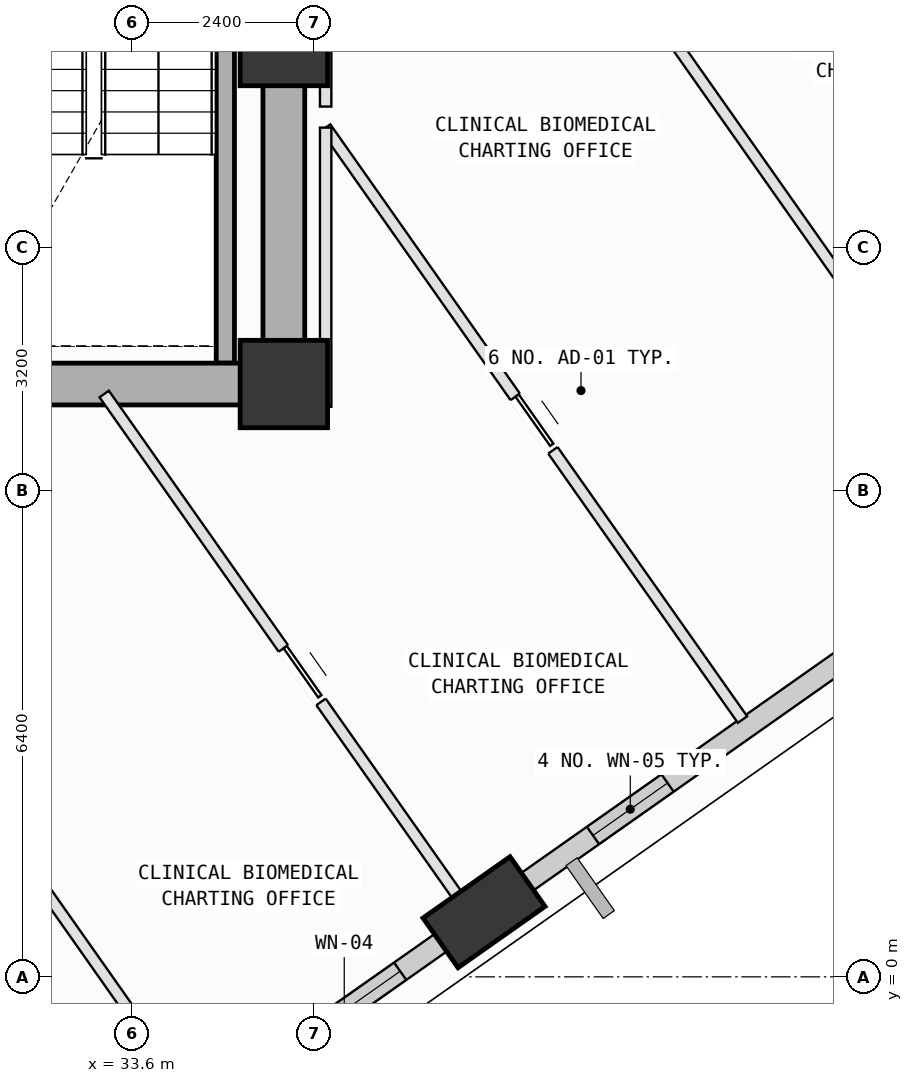
"""IFC4 building model, lengths in metres.
Left out: names, types, materials, properties, quantities, classifications, styles, units other than length and angle.
Written with IfcOpenShell. Run it as: python <this file> out.ifc"""

import sys

from ifc_helpers import new_model, si_unit, direction, frame, frame_2d, origin, origin_2d, place, context, subcontext, project, spatial, rectangle, extrude, element, fill, save


model = new_model("IFC4")
c1 = context("Model", 3, precision=1e-05, world=origin(), true_north=direction((0.0, 1.0)))
c2 = subcontext(c1, "Body", "Model", "MODEL_VIEW")
j1 = project(units=[si_unit("LENGTHUNIT", "METRE"), si_unit("PLANEANGLEUNIT", "RADIAN")], contexts=[c1])
p1 = place(None, origin())
s1 = spatial("IfcSite", under=j1, at=p1, CompositionType="ELEMENT")
p2 = place(p1, origin())
s2 = spatial("IfcBuilding", under=s1, at=p2, CompositionType="ELEMENT")
p3 = place(p2, frame((0.0, 0.0, 173.8)))
s3 = spatial("IfcBuildingStorey", under=s2, at=p3, CompositionType="ELEMENT", Elevation=173.8)
for number, where, z_axis, x_axis in (
    (1, (35.6, 7.8, 0.0), (0.0, 0.0, 1.0), (1.0, 0.0, 0.0)),
    (2, (35.6, 12.3, 0.0), (0.0, 0.0, 1.0), (1.0, 0.0, 0.0)),
):
    element("IfcColumn", number, at=place(p3, frame(where, z_axis=z_axis, x_axis=x_axis)), inside=s3, PredefinedType="COLUMN", context=c2, shape_type="SweptSolid", body=[
        extrude(rectangle(XDim=1.15, YDim=1.15, at=origin_2d()), origin(), (0.0, 0.0, 1.0), 4.0),
    ])
p4 = place(p3, frame((38.233, 0.85, 0.002), z_axis=(0.098647418268, 0.01993613875, 0.994922729281), x_axis=(-0.723413215701, 0.687979735835, 0.057941370623)))
e3 = element("IfcColumn", 3, at=p4, inside=s3, PredefinedType="COLUMN", context=c2, shape_type="SweptSolid", body=[
    extrude(rectangle(XDim=1.4, YDim=0.8, at=origin_2d()), origin(), (0.0, 0.0, 1.0), 4.017),
])
p5 = place(p3, frame((37.984, 0.675, 0.0), z_axis=(0.0, 0.0, 1.0), x_axis=(-0.817652115321, -0.575712617814, 0.0)))
e4 = element("IfcWall", 4, at=p5, inside=s3, PredefinedType="SOLIDWALL", context=c2, shape_type="SweptSolid", body=[
    extrude(rectangle(XDim=6.234, YDim=0.28, at=frame_2d((3.117, 0.0))), origin(), (0.0, 0.0, 1.0), 3.265),
])
p6 = place(p5, frame((1.044, 0.0, 0.75)))
e5 = element("IfcOpeningElement", 5, at=p6, cuts=e4, PredefinedType="OPENING", context=c2, shape_type="SweptSolid", body=[
    extrude(rectangle(XDim=1.8, YDim=2.05, at=frame_2d((0.9, 1.025))), frame((0.0, 0.15, 0.0), z_axis=(0.0, -1.0, 0.0), x_axis=(1.0, 0.0, 0.0)), (0.0, 0.0, 1.0), 0.3),
])
p7 = place(p3, frame((43.866, 4.816, 0.0), z_axis=(0.0, 0.0, 1.0), x_axis=(-0.81764887873, -0.575717214535, 0.0)))
e6 = element("IfcWall", 6, at=p7, inside=s3, PredefinedType="SOLIDWALL", context=c2, shape_type="SweptSolid", body=[
    extrude(rectangle(XDim=6.214, YDim=0.28, at=frame_2d((3.107, 0.0))), origin(), (0.0, 0.0, 1.0), 3.265),
])
p8 = place(p7, frame((3.935, 0.0, 0.75)))
e7 = element("IfcOpeningElement", 7, at=p8, cuts=e6, PredefinedType="OPENING", context=c2, shape_type="SweptSolid", body=[
    extrude(rectangle(XDim=1.2, YDim=1.75, at=frame_2d((0.6, 0.875))), frame((0.0, 0.15, 0.0), z_axis=(0.0, -1.0, 0.0), x_axis=(1.0, 0.0, 0.0)), (0.0, 0.0, 1.0), 0.3),
])
p9 = place(p3, frame((34.83, 15.12, 0.0), z_axis=(0.0, 0.0, 1.0), x_axis=(0.0, -1.0, 0.0)))
e8 = element("IfcWall", 8, at=p9, inside=s3, PredefinedType="SOLIDWALL", context=c2, shape_type="SweptSolid", body=[
    extrude(rectangle(XDim=7.045, YDim=0.24, at=frame_2d((3.522, 0.0))), origin(), (0.0, 0.0, 1.0), 3.78),
])
p10 = place(p3, frame((24.8, 7.8, 0.0), z_axis=(0.0, 0.0, 1.0), x_axis=(1.0, 0.0, 0.0)))
e9 = element("IfcWall", 9, at=p10, inside=s3, PredefinedType="SHEAR", context=c2, shape_type="SweptSolid", body=[
    extrude(rectangle(XDim=10.8, YDim=0.55, at=frame_2d((5.4, 0.0))), origin(), (0.0, 0.0, 1.0), 3.78),
])
p11 = place(p3, frame((35.6, 7.8, 0.0), z_axis=(0.0, 0.0, 1.0), x_axis=(0.0, 1.0, 0.0)))
e10 = element("IfcWall", 10, at=p11, inside=s3, PredefinedType="SHEAR", context=c2, shape_type="SweptSolid", body=[
    extrude(rectangle(XDim=9.0, YDim=0.55, at=frame_2d((4.5, 0.0))), origin(), (0.0, 0.0, 1.0), 3.78),
])
p12 = place(p3, frame((27.855, 7.669, 0.0), z_axis=(0.0, 0.0, 1.0), x_axis=(0.57575409581, -0.8176229089, 0.0)))
e11 = element("IfcWall", 11, at=p12, inside=s3, PredefinedType="PARTITIONING", context=c2, shape_type="SweptSolid", body=[
    extrude(rectangle(XDim=11.435, YDim=0.15, at=frame_2d((5.718, 0.0))), origin(), (0.0, 0.0, 1.0), 3.78),
])
p13 = place(p12, frame((5.471, 0.0, 0.0)))
e12 = element("IfcOpeningElement", 12, at=p13, cuts=e11, PredefinedType="OPENING", context=c2, shape_type="SweptSolid", body=[
    extrude(rectangle(XDim=0.86, YDim=2.06, at=frame_2d((0.43, 1.03))), frame((0.0, 0.085, 0.0), z_axis=(0.0, -1.0, 0.0), x_axis=(1.0, 0.0, 0.0)), (0.0, 0.0, 1.0), 0.17),
])
p14 = place(p3, frame((33.236, 7.669, 0.0), z_axis=(0.0, 0.0, 1.0), x_axis=(0.575764322931, -0.817615707065, 0.0)))
e13 = element("IfcWall", 13, at=p14, inside=s3, PredefinedType="PARTITIONING", context=c2, shape_type="SweptSolid", body=[
    extrude(rectangle(XDim=8.682, YDim=0.15, at=frame_2d((4.341, 0.0))), origin(), (0.0, 0.0, 1.0), 3.78),
])
p15 = place(p14, frame((4.095, 0.0, 0.0)))
e14 = element("IfcOpeningElement", 14, at=p15, cuts=e13, PredefinedType="OPENING", context=c2, shape_type="SweptSolid", body=[
    extrude(rectangle(XDim=0.86, YDim=2.06, at=frame_2d((0.43, 1.03))), frame((0.0, 0.085, 0.0), z_axis=(0.0, -1.0, 0.0), x_axis=(1.0, 0.0, 0.0)), (0.0, 0.0, 1.0), 0.17),
])
p16 = place(p3, frame((36.15, 11.174, 0.0), z_axis=(0.0, 0.0, 1.0), x_axis=(0.575699711448, -0.817661202601, 0.0)))
e15 = element("IfcWall", 15, at=p16, inside=s3, PredefinedType="PARTITIONING", context=c2, shape_type="SweptSolid", body=[
    extrude(rectangle(XDim=9.526, YDim=0.15, at=frame_2d((4.763, 0.0))), origin(), (0.0, 0.0, 1.0), 3.78),
])
p17 = place(p16, frame((4.333, 0.0, 0.0)))
e16 = element("IfcOpeningElement", 16, at=p17, cuts=e15, PredefinedType="OPENING", context=c2, shape_type="SweptSolid", body=[
    extrude(rectangle(XDim=0.86, YDim=2.06, at=frame_2d((0.43, 1.03))), frame((0.0, 0.085, 0.0), z_axis=(0.0, -1.0, 0.0), x_axis=(1.0, 0.0, 0.0)), (0.0, 0.0, 1.0), 0.17),
])
p18 = place(p3, frame((38.917, 1.05, 0.0), z_axis=(0.0, 0.0, 1.0), x_axis=(-0.817680097972, -0.575672873584, 0.0)))
e17 = element("IfcWall", 17, at=p18, inside=s3, PredefinedType="PARTITIONING", context=c2, shape_type="SweptSolid", body=[
    extrude(rectangle(XDim=0.674, YDim=0.15, at=frame_2d((0.337, 0.0))), origin(), (0.0, 0.0, 1.0), 3.265),
])
p19 = place(p3, frame((35.6, 7.5, 0.0), z_axis=(0.0, 0.0, 1.0), x_axis=(1.0, 0.0, 0.0)))
e18 = element("IfcWall", 18, at=p19, inside=s3, PredefinedType="PARTITIONING", context=c2, shape_type="SweptSolid", body=[
    extrude(rectangle(XDim=0.55, YDim=0.15, at=frame_2d((0.275, 0.0))), origin(), (0.0, 0.0, 1.0), 3.065),
])
p20 = place(p3, frame((36.15, 7.5, 0.0), z_axis=(0.0, 0.0, 1.0), x_axis=(0.0, 1.0, 0.0)))
e19 = element("IfcWall", 19, at=p20, inside=s3, PredefinedType="PARTITIONING", context=c2, shape_type="SweptSolid", body=[
    extrude(rectangle(XDim=3.674, YDim=0.15, at=frame_2d((1.837, 0.0))), origin(), (0.0, 0.0, 1.0), 3.78),
])
p21 = place(p3, frame((38.36, 15.677, 0.0), z_axis=(0.0, 0.0, 1.0), x_axis=(0.575682896217, -0.817673041627, 0.0)))
e20 = element("IfcWall", 20, at=p21, inside=s3, PredefinedType="PARTITIONING", context=c2, shape_type="SweptSolid", body=[
    extrude(rectangle(XDim=11.935, YDim=0.15, at=frame_2d((5.968, 0.0))), origin(), (0.0, 0.0, 1.0), 3.78),
])
p22 = place(p3, frame((36.15, 11.451, 0.0), z_axis=(0.0, 0.0, 1.0), x_axis=(0.0, 1.0, 0.0)))
e21 = element("IfcWall", 21, at=p22, inside=s3, PredefinedType="PARTITIONING", context=c2, shape_type="SweptSolid", body=[
    extrude(rectangle(XDim=2.67, YDim=0.15, at=frame_2d((1.335, 0.0))), origin(), (0.0, 0.0, 1.0), 3.78),
])
p23 = place(p3, frame((42.04, 18.268, 0.0), z_axis=(0.0, 0.0, 1.0), x_axis=(0.575682896217, -0.817673041627, 0.0)))
e22 = element("IfcWall", 22, at=p23, inside=s3, PredefinedType="PARTITIONING", context=c2, shape_type="SweptSolid", body=[
    extrude(rectangle(XDim=11.935, YDim=0.15, at=frame_2d((5.968, 0.0))), origin(), (0.0, 0.0, 1.0), 3.78),
])
p24 = place(p6, origin())
e23 = element("IfcWindow", 23, at=p24, inside=s3, PartitioningType="SINGLE_PANEL", PredefinedType="WINDOW", context=c2, shape_type="SweptSolid", body=[
    extrude(rectangle(XDim=1.8, YDim=2.05, at=frame_2d((0.9, 1.025))), frame((0.0, 0.03, 0.0), z_axis=(0.0, -1.0, 0.0), x_axis=(1.0, 0.0, 0.0)), (0.0, 0.0, 1.0), 0.06),
])
fill(e5, e23)
p25 = place(p8, origin())
e24 = element("IfcWindow", 24, at=p25, inside=s3, PartitioningType="SINGLE_PANEL", PredefinedType="WINDOW", context=c2, shape_type="SweptSolid", body=[
    extrude(rectangle(XDim=1.2, YDim=1.75, at=frame_2d((0.6, 0.875))), frame((0.0, 0.03, 0.0), z_axis=(0.0, -1.0, 0.0), x_axis=(1.0, 0.0, 0.0)), (0.0, 0.0, 1.0), 0.06),
])
fill(e7, e24)
p26 = place(p17, origin())
e25 = element("IfcDoor", 25, at=p26, inside=s3, OperationType="SLIDING_TO_LEFT", PredefinedType="DOOR", context=c2, shape_type="SweptSolid", body=[
    extrude(rectangle(XDim=0.86, YDim=2.06, at=frame_2d((0.43, 1.03))), frame((0.0, 0.025, 0.0), z_axis=(0.0, -1.0, 0.0), x_axis=(1.0, 0.0, 0.0)), (0.0, 0.0, 1.0), 0.05),
])
fill(e16, e25)
p27 = place(p15, origin())
e26 = element("IfcDoor", 26, at=p27, inside=s3, OperationType="SLIDING_TO_LEFT", PredefinedType="DOOR", context=c2, shape_type="SweptSolid", body=[
    extrude(rectangle(XDim=0.86, YDim=2.06, at=frame_2d((0.43, 1.03))), frame((0.0, 0.025, 0.0), z_axis=(0.0, -1.0, 0.0), x_axis=(1.0, 0.0, 0.0)), (0.0, 0.0, 1.0), 0.05),
])
fill(e14, e26)
save(model, sys.argv[1])
